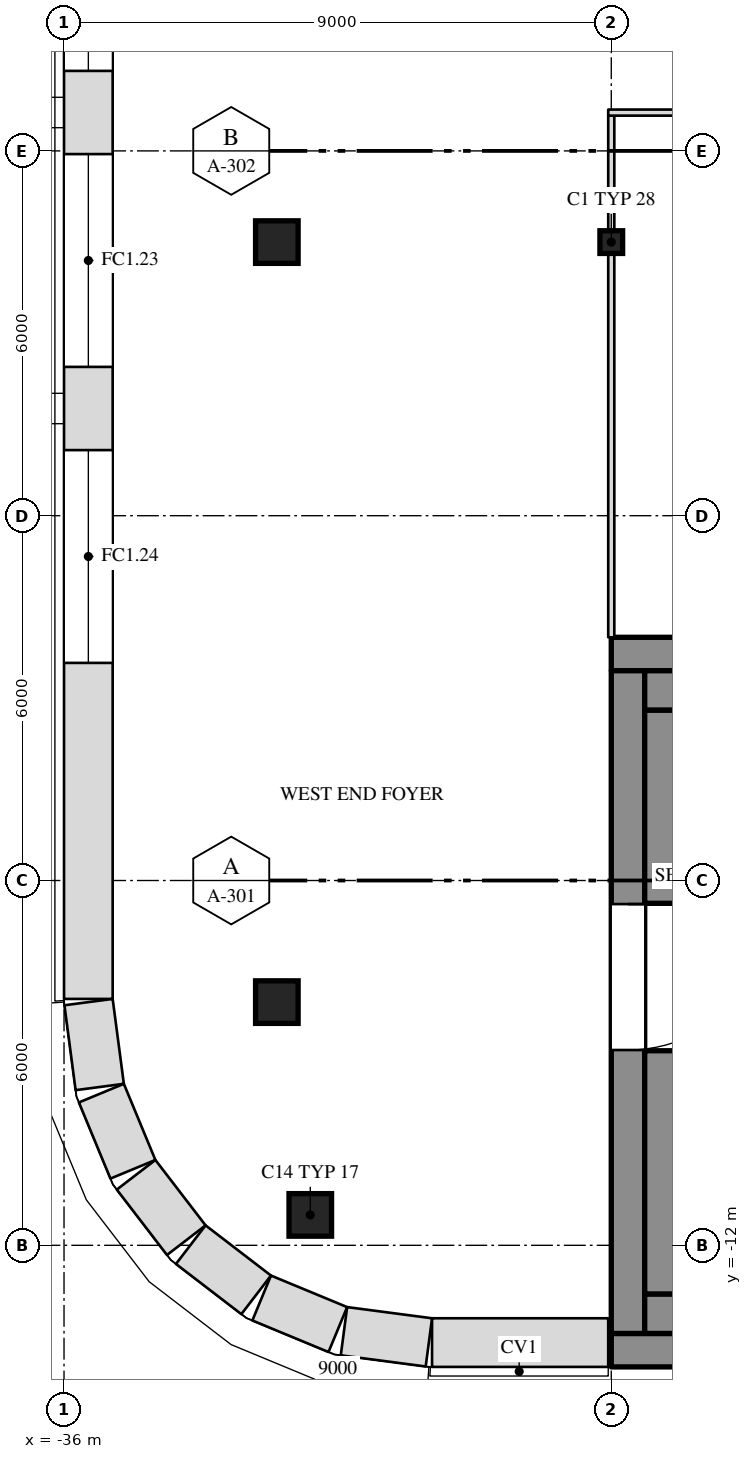
"""IFC4 building model, lengths in metres.
Left out: names, types, materials, properties, quantities, classifications, styles, units other than length and angle.
Written with IfcOpenShell. Run it as: python <this file> out.ifc"""

import sys

from ifc_helpers import new_model, si_unit, direction, frame, frame_2d, origin, origin_2d, place, context, subcontext, project, spatial, rectangle, i_section, extrude, element, fill, save


model = new_model("IFC4")
c1 = context("Model", 3, precision=1e-05, world=origin(), true_north=direction((0.0, 1.0)))
c2 = subcontext(c1, "Body", "Model", "MODEL_VIEW")
j1 = project(units=[si_unit("LENGTHUNIT", "METRE"), si_unit("PLANEANGLEUNIT", "RADIAN")], contexts=[c1])
p1 = place(None, origin())
s1 = spatial("IfcSite", under=j1, at=p1, CompositionType="ELEMENT")
p2 = place(p1, origin())
s2 = spatial("IfcBuilding", under=s1, at=p2, CompositionType="ELEMENT")
p3 = place(p2, frame((0.0, 0.0, 272.5)))
s3 = spatial("IfcBuildingStorey", under=s2, at=p3, CompositionType="ELEMENT", Elevation=272.5)
for number, where, z_axis, x_axis in (
    (1, (-31.95, -11.5, 0.0), (0.0, 0.0, 1.0), (1.0, 0.0, 0.0)),
    (2, (-32.5, -8.0, 0.0), (0.0, 0.0, 1.0), (1.0, 0.0, 0.0)),
    (3, (-32.5, 4.5, 0.0), (0.0, 0.0, 1.0), (1.0, 0.0, 0.0)),
):
    element("IfcColumn", number, at=place(p3, frame(where, z_axis=z_axis, x_axis=x_axis)), inside=s3, PredefinedType="COLUMN", context=c2, shape_type="SweptSolid", body=[
        extrude(rectangle(XDim=0.7, YDim=0.7, at=origin_2d()), origin(), (0.0, 0.0, 1.0), 4.0),
    ])
p4 = place(p3, frame((-27.0, 4.5, 0.0), z_axis=(0.0, 0.0, 1.0), x_axis=(1.0, 0.0, 0.0)))
e4 = element("IfcColumn", 4, at=p4, inside=s3, PredefinedType="COLUMN", context=c2, shape_type="SweptSolid", body=[
    extrude(i_section(OverallWidth=0.373, OverallDepth=0.373, WebThickness=0.016, FlangeThickness=0.026, at=origin_2d()), origin(), (0.0, 0.0, 1.0), 4.0),
])
p5 = place(p3, frame((-27.0, -2.275, 0.0), z_axis=(0.0, 0.0, 1.0), x_axis=(1.0, 0.0, 0.0)))
e5 = element("IfcWall", 5, at=p5, inside=s3, PredefinedType="SHEAR", context=c2, shape_type="SweptSolid", body=[
    extrude(rectangle(XDim=54.0, YDim=0.55, at=frame_2d((27.0, 0.0))), origin(), (0.0, 0.0, 1.0), 3.78),
])
p6 = place(p5, frame((15.15, 0.0, 0.0)))
e6 = element("IfcOpeningElement", 6, at=p6, cuts=e5, PredefinedType="OPENING", context=c2, shape_type="SweptSolid", body=[
    extrude(rectangle(XDim=2.4, YDim=2.1, at=frame_2d((1.2, 1.05))), frame((0.0, 0.287, 0.0), z_axis=(0.0, -1.0, 0.0), x_axis=(1.0, 0.0, 0.0)), (0.0, 0.0, 1.0), 0.574),
])
p7 = place(p5, frame((36.45, 0.0, 0.0)))
e7 = element("IfcOpeningElement", 7, at=p7, cuts=e5, PredefinedType="OPENING", context=c2, shape_type="SweptSolid", body=[
    extrude(rectangle(XDim=2.4, YDim=2.1, at=frame_2d((1.2, 1.05))), frame((0.0, 0.287, 0.0), z_axis=(0.0, -1.0, 0.0), x_axis=(1.0, 0.0, 0.0)), (0.0, 0.0, 1.0), 0.574),
])
p8 = place(p3, frame((-27.0, -13.725, 0.0), z_axis=(0.0, 0.0, 1.0), x_axis=(1.0, 0.0, 0.0)))
e8 = element("IfcWall", 8, at=p8, inside=s3, PredefinedType="SHEAR", context=c2, shape_type="SweptSolid", body=[
    extrude(rectangle(XDim=54.0, YDim=0.55, at=frame_2d((27.0, 0.0))), origin(), (0.0, 0.0, 1.0), 3.78),
])
p9 = place(p3, frame((-26.725, -13.45, 0.0), z_axis=(0.0, 0.0, 1.0), x_axis=(0.0, 1.0, 0.0)))
e9 = element("IfcWall", 9, at=p9, inside=s3, PredefinedType="SHEAR", context=c2, shape_type="SweptSolid", body=[
    extrude(rectangle(XDim=10.9, YDim=0.55, at=frame_2d((5.45, 0.0))), origin(), (0.0, 0.0, 1.0), 3.78),
])
p10 = place(p9, frame((4.662, 0.0, 0.0)))
e10 = element("IfcOpeningElement", 10, at=p10, cuts=e9, PredefinedType="OPENING", context=c2, shape_type="SweptSolid", body=[
    extrude(rectangle(XDim=2.4, YDim=2.1, at=frame_2d((1.2, 1.05))), frame((0.0, 0.287, 0.0), z_axis=(0.0, -1.0, 0.0), x_axis=(1.0, 0.0, 0.0)), (0.0, 0.0, 1.0), 0.574),
])
p11 = place(p3, frame((-26.45, -2.875, 0.0), z_axis=(0.0, 0.0, 1.0), x_axis=(1.0, 0.0, 0.0)))
e11 = element("IfcWall", 11, at=p11, inside=s3, PredefinedType="SHEAR", context=c2, shape_type="SweptSolid", body=[
    extrude(rectangle(XDim=14.45, YDim=0.65, at=frame_2d((7.225, 0.0))), origin(), (0.0, 0.0, 1.0), 3.78),
])
p12 = place(p3, frame((-26.45, -13.125, 0.0), z_axis=(0.0, 0.0, 1.0), x_axis=(1.0, 0.0, 0.0)))
e12 = element("IfcWall", 12, at=p12, inside=s3, PredefinedType="SHEAR", context=c2, shape_type="SweptSolid", body=[
    extrude(rectangle(XDim=52.9, YDim=0.65, at=frame_2d((26.45, 0.0))), origin(), (0.0, 0.0, 1.0), 3.78),
])
p13 = place(p3, frame((-26.125, -12.8, 0.0), z_axis=(0.0, 0.0, 1.0), x_axis=(0.0, 1.0, 0.0)))
e13 = element("IfcWall", 13, at=p13, inside=s3, PredefinedType="SHEAR", context=c2, shape_type="SweptSolid", body=[
    extrude(rectangle(XDim=4.0, YDim=0.65, at=frame_2d((2.0, 0.0))), origin(), (0.0, 0.0, 1.0), 3.78),
])
p14 = place(p3, frame((-26.125, -6.375, 0.0), z_axis=(0.0, 0.0, 1.0), x_axis=(0.0, 1.0, 0.0)))
e14 = element("IfcWall", 14, at=p14, inside=s3, PredefinedType="SHEAR", context=c2, shape_type="SweptSolid", body=[
    extrude(rectangle(XDim=3.175, YDim=0.65, at=frame_2d((1.587, 0.0))), origin(), (0.0, 0.0, 1.0), 3.78),
])
p15 = place(p3, frame((-27.0, -2.0, 0.0), z_axis=(0.0, 0.0, 1.0), x_axis=(0.0, 1.0, 0.0)))
e15 = element("IfcWall", 15, at=p15, inside=s3, PredefinedType="PARTITIONING", context=c2, shape_type="SweptSolid", body=[
    extrude(rectangle(XDim=6.313, YDim=0.1, at=frame_2d((3.157, 0.0))), origin(), (0.0, 0.0, 1.0), 3.247),
])
p16 = place(p3, frame((-27.0, 4.687, 0.0), z_axis=(0.0, 0.0, 1.0), x_axis=(0.0, 1.0, 0.0)))
e16 = element("IfcWall", 16, at=p16, inside=s3, PredefinedType="PARTITIONING", context=c2, shape_type="SweptSolid", body=[
    extrude(rectangle(XDim=1.893, YDim=0.1, at=frame_2d((0.947, 0.0))), origin(), (0.0, 0.0, 1.0), 3.247),
])
p17 = place(p3, frame((-27.05, 6.63, 0.0), z_axis=(0.0, 0.0, 1.0), x_axis=(1.0, 0.0, 0.0)))
e17 = element("IfcWall", 17, at=p17, inside=s3, PredefinedType="PARTITIONING", context=c2, shape_type="SweptSolid", body=[
    extrude(rectangle(XDim=13.6, YDim=0.1, at=frame_2d((6.8, 0.0))), origin(), (0.0, 0.0, 1.0), 3.78),
])
p18 = place(p17, frame((6.35, 0.0, 0.0)))
e18 = element("IfcOpeningElement", 18, at=p18, cuts=e17, PredefinedType="OPENING", context=c2, shape_type="SweptSolid", body=[
    extrude(rectangle(XDim=0.9, YDim=2.1, at=frame_2d((0.45, 1.05))), frame((0.0, 0.062, 0.0), z_axis=(0.0, -1.0, 0.0), x_axis=(1.0, 0.0, 0.0)), (0.0, 0.0, 1.0), 0.124),
])
p19 = place(p3, frame((-29.948, -13.6, 0.0), z_axis=(0.0, 0.0, 1.0), x_axis=(1.0, 0.0, 0.0)))
e19 = element("IfcWall", 19, at=p19, inside=s3, PredefinedType="SOLIDWALL", context=c2, shape_type="SweptSolid", body=[
    extrude(rectangle(XDim=2.897, YDim=0.8, at=frame_2d((1.449, 0.0))), origin(), (0.0, 0.0, 1.0), 3.78),
])
p20 = place(p3, frame((-35.6, 30.948, 0.0), z_axis=(0.0, 0.0, 1.0), x_axis=(0.0, -1.0, 0.0)))
e20 = element("IfcWall", 20, at=p20, inside=s3, PredefinedType="SOLIDWALL", context=c2, shape_type="SweptSolid", body=[
    extrude(rectangle(XDim=38.895, YDim=0.8, at=frame_2d((19.448, 0.0))), origin(), (0.0, 0.0, 1.0), 3.78),
])
p21 = place(p20, frame((5.526, 0.0, 1.0)))
e21 = element("IfcOpeningElement", 21, at=p21, cuts=e20, PredefinedType="OPENING", context=c2, shape_type="SweptSolid", body=[
    extrude(rectangle(XDim=3.5, YDim=2.5, at=frame_2d((1.75, 1.25))), frame((0.0, 0.412, 0.0), z_axis=(0.0, -1.0, 0.0), x_axis=(1.0, 0.0, 0.0)), (0.0, 0.0, 1.0), 0.824),
])
p22 = place(p20, frame((10.395, 0.0, 1.0)))
e22 = element("IfcOpeningElement", 22, at=p22, cuts=e20, PredefinedType="OPENING", context=c2, shape_type="SweptSolid", body=[
    extrude(rectangle(XDim=3.5, YDim=2.5, at=frame_2d((1.75, 1.25))), frame((0.0, 0.412, 0.0), z_axis=(0.0, -1.0, 0.0), x_axis=(1.0, 0.0, 0.0)), (0.0, 0.0, 1.0), 0.824),
])
p23 = place(p20, frame((15.263, 0.0, 1.0)))
e23 = element("IfcOpeningElement", 23, at=p23, cuts=e20, PredefinedType="OPENING", context=c2, shape_type="SweptSolid", body=[
    extrude(rectangle(XDim=3.5, YDim=2.5, at=frame_2d((1.75, 1.25))), frame((0.0, 0.412, 0.0), z_axis=(0.0, -1.0, 0.0), x_axis=(1.0, 0.0, 0.0)), (0.0, 0.0, 1.0), 0.824),
])
p24 = place(p20, frame((20.132, 0.0, 1.0)))
e24 = element("IfcOpeningElement", 24, at=p24, cuts=e20, PredefinedType="OPENING", context=c2, shape_type="SweptSolid", body=[
    extrude(rectangle(XDim=3.5, YDim=2.5, at=frame_2d((1.75, 1.25))), frame((0.0, 0.412, 0.0), z_axis=(0.0, -1.0, 0.0), x_axis=(1.0, 0.0, 0.0)), (0.0, 0.0, 1.0), 0.824),
])
p25 = place(p20, frame((25.0, 0.0, 1.0)))
e25 = element("IfcOpeningElement", 25, at=p25, cuts=e20, PredefinedType="OPENING", context=c2, shape_type="SweptSolid", body=[
    extrude(rectangle(XDim=3.5, YDim=2.5, at=frame_2d((1.75, 1.25))), frame((0.0, 0.412, 0.0), z_axis=(0.0, -1.0, 0.0), x_axis=(1.0, 0.0, 0.0)), (0.0, 0.0, 1.0), 0.824),
])
p26 = place(p20, frame((29.869, 0.0, 1.0)))
e26 = element("IfcOpeningElement", 26, at=p26, cuts=e20, PredefinedType="OPENING", context=c2, shape_type="SweptSolid", body=[
    extrude(rectangle(XDim=3.5, YDim=2.5, at=frame_2d((1.75, 1.25))), frame((0.0, 0.412, 0.0), z_axis=(0.0, -1.0, 0.0), x_axis=(1.0, 0.0, 0.0)), (0.0, 0.0, 1.0), 0.824),
])
p27 = place(p3, frame((-35.597, -8.0, 0.0), z_axis=(0.0, 0.0, 1.0), x_axis=(0.130517283865, -0.99144603414, 0.0)))
e27 = element("IfcWall", 27, at=p27, inside=s3, PredefinedType="SOLIDWALL", context=c2, shape_type="SweptSolid", body=[
    extrude(rectangle(XDim=1.408, YDim=0.8, at=frame_2d((0.704, 0.0))), origin(), (0.0, 0.0, 1.0), 3.78),
])
p28 = place(p3, frame((-35.386, -9.497, 0.0), z_axis=(0.0, 0.0, 1.0), x_axis=(0.38276009378, -0.923847774587, 0.0)))
e28 = element("IfcWall", 28, at=p28, inside=s3, PredefinedType="SOLIDWALL", context=c2, shape_type="SweptSolid", body=[
    extrude(rectangle(XDim=1.355, YDim=0.8, at=frame_2d((0.678, 0.0))), origin(), (0.0, 0.0, 1.0), 3.78),
])
for number, where, z_axis, x_axis in (
    (29, (-34.815, -10.84, 0.0), (0.0, 0.0, 1.0), (0.609, -0.793, 0.0)),
    (30, (-33.916, -11.989, 0.0), (0.0, 0.0, 1.0), (0.793, -0.609, 0.0)),
):
    element("IfcWall", number, at=place(p3, frame(where, z_axis=z_axis, x_axis=x_axis)), inside=s3, PredefinedType="SOLIDWALL", context=c2, shape_type="SweptSolid", body=[
        extrude(rectangle(XDim=1.356, YDim=0.8, at=frame_2d((0.678, 0.0))), origin(), (0.0, 0.0, 1.0), 3.78),
    ])
p29 = place(p3, frame((-32.75, -12.867, 0.0), z_axis=(0.0, 0.0, 1.0), x_axis=(0.923847774587, -0.38276009378, 0.0)))
e31 = element("IfcWall", 31, at=p29, inside=s3, PredefinedType="SOLIDWALL", context=c2, shape_type="SweptSolid", body=[
    extrude(rectangle(XDim=1.355, YDim=0.8, at=frame_2d((0.678, 0.0))), origin(), (0.0, 0.0, 1.0), 3.78),
])
p30 = place(p3, frame((-31.396, -13.413, 0.0), z_axis=(0.0, 0.0, 1.0), x_axis=(0.99144603414, -0.130517283865, 0.0)))
e32 = element("IfcWall", 32, at=p30, inside=s3, PredefinedType="SOLIDWALL", context=c2, shape_type="SweptSolid", body=[
    extrude(rectangle(XDim=1.408, YDim=0.8, at=frame_2d((0.704, 0.0))), origin(), (0.0, 0.0, 1.0), 3.78),
])
p31 = place(p24, origin())
e33 = element("IfcWindow", 33, at=p31, inside=s3, PartitioningType="SINGLE_PANEL", PredefinedType="WINDOW", context=c2, shape_type="SweptSolid", body=[
    extrude(rectangle(XDim=3.5, YDim=2.5, at=frame_2d((1.75, 1.25))), frame((0.0, 0.03, 0.0), z_axis=(0.0, -1.0, 0.0), x_axis=(1.0, 0.0, 0.0)), (0.0, 0.0, 1.0), 0.06),
])
fill(e24, e33)
p32 = place(p25, origin())
e34 = element("IfcWindow", 34, at=p32, inside=s3, PartitioningType="SINGLE_PANEL", PredefinedType="WINDOW", context=c2, shape_type="SweptSolid", body=[
    extrude(rectangle(XDim=3.5, YDim=2.5, at=frame_2d((1.75, 1.25))), frame((0.0, 0.03, 0.0), z_axis=(0.0, -1.0, 0.0), x_axis=(1.0, 0.0, 0.0)), (0.0, 0.0, 1.0), 0.06),
])
fill(e25, e34)
p33 = place(p26, origin())
e35 = element("IfcWindow", 35, at=p33, inside=s3, PartitioningType="SINGLE_PANEL", PredefinedType="WINDOW", context=c2, shape_type="SweptSolid", body=[
    extrude(rectangle(XDim=3.5, YDim=2.5, at=frame_2d((1.75, 1.25))), frame((0.0, 0.03, 0.0), z_axis=(0.0, -1.0, 0.0), x_axis=(1.0, 0.0, 0.0)), (0.0, 0.0, 1.0), 0.06),
])
fill(e26, e35)
p34 = place(p10, origin())
e36 = element("IfcDoor", 36, at=p34, inside=s3, OperationType="DOUBLE_DOOR_SINGLE_SWING", PredefinedType="DOOR", context=c2, shape_type="SweptSolid", body=[
    extrude(rectangle(XDim=2.4, YDim=2.1, at=frame_2d((1.2, 1.05))), frame((0.0, 0.025, 0.0), z_axis=(0.0, -1.0, 0.0), x_axis=(1.0, 0.0, 0.0)), (0.0, 0.0, 1.0), 0.05),
])
fill(e10, e36)
save(model, sys.argv[1])
